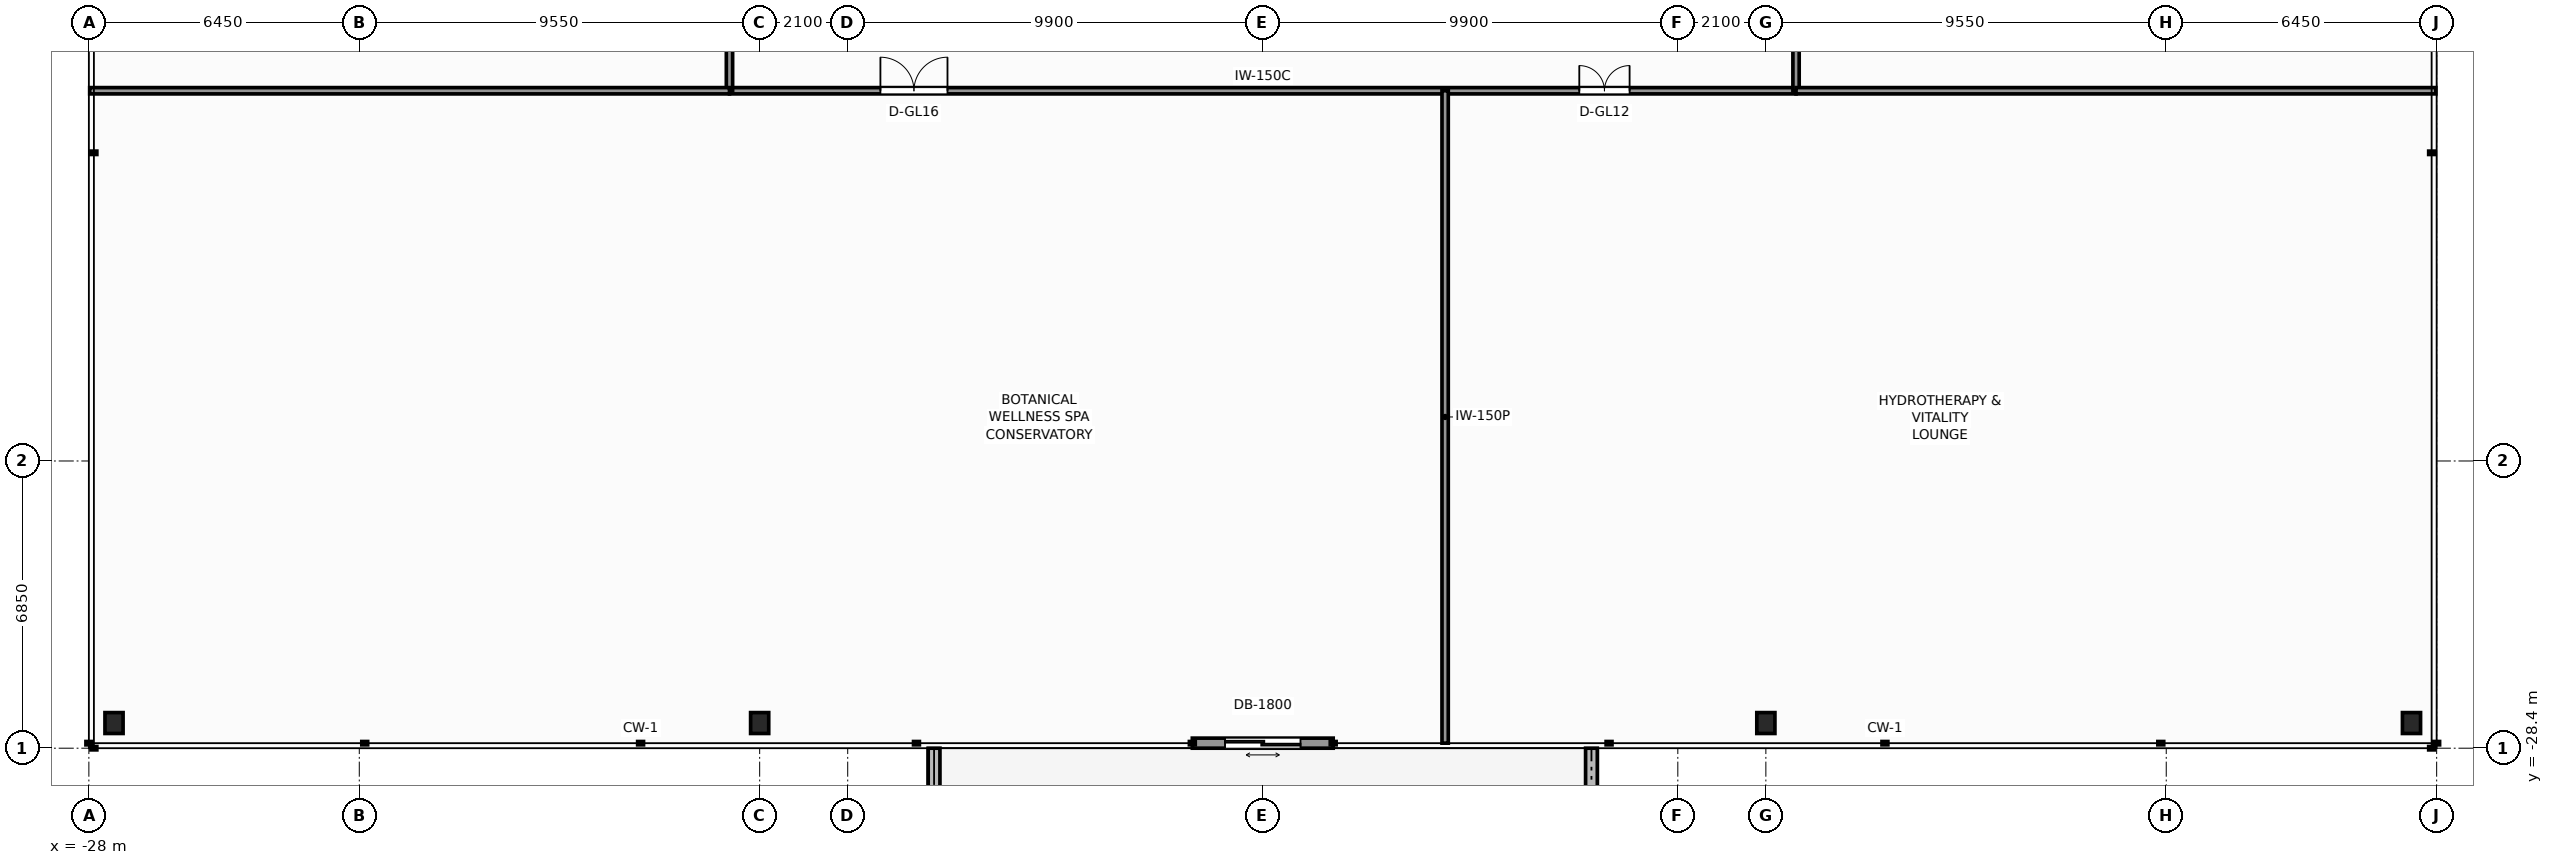
"""IFC4 building model, lengths in metres.
Left out: names, types, materials, properties, quantities, classifications, styles, units other than length and angle.
Written with IfcOpenShell. Run it as: python <this file> out.ifc"""

import sys

from ifc_helpers import new_model, si_unit, direction, frame, frame_2d, origin, origin_2d, place, context, subcontext, project, spatial, rectangle, i_section, extrude, element, fill, save


model = new_model("IFC4")
c1 = context("Model", 3, precision=1e-05, world=origin(), true_north=direction((0.0, 1.0)))
c2 = subcontext(c1, "Body", "Model", "MODEL_VIEW")
j1 = project(units=[si_unit("LENGTHUNIT", "METRE"), si_unit("PLANEANGLEUNIT", "RADIAN")], contexts=[c1])
p1 = place(None, origin())
s1 = spatial("IfcSite", under=j1, at=p1, CompositionType="ELEMENT")
p2 = place(p1, origin())
s2 = spatial("IfcBuilding", under=s1, at=p2, CompositionType="ELEMENT")
p3 = place(p2, frame((0.0, 0.0, 15.2)))
s3 = spatial("IfcBuildingStorey", under=s2, at=p3, CompositionType="ELEMENT", Elevation=15.2)
for number, where, z_axis, x_axis in (
    (1, (-27.4, -27.8, 0.0), (0.0, 0.0, 1.0), (1.0, 0.0, 0.0)),
    (2, (-12.0, -27.8, 0.0), (0.0, 0.0, 1.0), (1.0, 0.0, 0.0)),
    (3, (12.0, -27.8, 0.0), (0.0, 0.0, 1.0), (1.0, 0.0, 0.0)),
    (4, (27.4, -27.8, 0.0), (0.0, 0.0, 1.0), (1.0, 0.0, 0.0)),
):
    element("IfcColumn", number, at=place(p3, frame(where, z_axis=z_axis, x_axis=x_axis)), inside=s3, PredefinedType="COLUMN", context=c2, shape_type="SweptSolid", body=[
        extrude(i_section(OverallWidth=0.432, OverallDepth=0.498, WebThickness=0.056, FlangeThickness=0.089, FilletRadius=0.025, at=origin_2d()), origin(), (0.0, 0.0, 1.0), 4.1),
    ])
for number, where, z_axis, x_axis in (
    (5, (7.84, -31.6, -0.02), (0.0, 0.0, 1.0), (0.0, 1.0, 0.0)),
    (6, (-7.84, -28.4, -0.02), (0.0, 0.0, 1.0), (0.0, -1.0, 0.0)),
):
    element("IfcWall", number, at=place(p3, frame(where, z_axis=z_axis, x_axis=x_axis)), inside=s3, PredefinedType="PARAPET", context=c2, shape_type="SweptSolid", body=[
        extrude(rectangle(XDim=3.2, YDim=0.28, at=frame_2d((1.6, 0.0))), origin(), (0.0, 0.0, 1.0), 0.42),
    ])
p4 = place(p3, frame((1.68, -28.28, 0.0), z_axis=(0.0, 0.0, 1.0), x_axis=(-1.0, 0.0, 0.0)))
e7 = element("IfcWall", 7, at=p4, inside=s3, PredefinedType="STANDARD", context=c2, shape_type="SweptSolid", body=[
    extrude(rectangle(XDim=3.36, YDim=0.24, at=frame_2d((1.68, 0.0))), origin(), (0.0, 0.0, 1.0), 3.7),
])
p5 = place(p4, frame((0.78, 0.0, 0.0)))
e8 = element("IfcOpeningElement", 8, at=p5, cuts=e7, PredefinedType="OPENING", context=c2, shape_type="SweptSolid", body=[
    extrude(rectangle(XDim=1.8, YDim=2.2, at=frame_2d((0.9, 1.1))), frame((0.0, 0.13, 0.0), z_axis=(0.0, -1.0, 0.0), x_axis=(1.0, 0.0, 0.0)), (0.0, 0.0, 1.0), 0.26),
])
p6 = place(p3, frame((-12.72, -12.72, 0.0), z_axis=(0.0, 0.0, 1.0), x_axis=(1.0, 0.0, 0.0)))
e9 = element("IfcWall", 9, at=p6, inside=s3, PredefinedType="PARTITIONING", context=c2, shape_type="SweptSolid", body=[
    extrude(rectangle(XDim=25.44, YDim=0.15, at=frame_2d((12.72, 0.0))), origin(), (0.0, 0.0, 1.0), 2.674),
])
p7 = place(p6, frame((3.6, 0.0, 0.0)))
e10 = element("IfcOpeningElement", 10, at=p7, cuts=e9, PredefinedType="OPENING", context=c2, shape_type="SweptSolid", body=[
    extrude(rectangle(XDim=1.6, YDim=2.3, at=frame_2d((0.8, 1.15))), frame((0.0, 0.085, 0.0), z_axis=(0.0, -1.0, 0.0), x_axis=(1.0, 0.0, 0.0)), (0.0, 0.0, 1.0), 0.17),
])
p8 = place(p6, frame((20.27, 0.0, 0.0)))
e11 = element("IfcOpeningElement", 11, at=p8, cuts=e9, PredefinedType="OPENING", context=c2, shape_type="SweptSolid", body=[
    extrude(rectangle(XDim=1.2, YDim=2.2, at=frame_2d((0.6, 1.1))), frame((0.0, 0.085, 0.0), z_axis=(0.0, -1.0, 0.0), x_axis=(1.0, 0.0, 0.0)), (0.0, 0.0, 1.0), 0.17),
])
p9 = place(p3, frame((-12.72, -12.72, 0.0), z_axis=(0.0, 0.0, 1.0), x_axis=(0.0, 1.0, 0.0)))
e12 = element("IfcWall", 12, at=p9, inside=s3, PredefinedType="PARTITIONING", context=c2, shape_type="SweptSolid", body=[
    extrude(rectangle(XDim=12.42, YDim=0.15, at=frame_2d((6.21, 0.0))), origin(), (0.0, 0.0, 1.0), 2.674),
])
p10 = place(p9, frame((3.4, 0.0, 0.0)))
e13 = element("IfcOpeningElement", 13, at=p10, cuts=e12, PredefinedType="OPENING", context=c2, shape_type="SweptSolid", body=[
    extrude(rectangle(XDim=1.2, YDim=2.2, at=frame_2d((0.6, 1.1))), frame((0.0, 0.085, 0.0), z_axis=(0.0, -1.0, 0.0), x_axis=(1.0, 0.0, 0.0)), (0.0, 0.0, 1.0), 0.17),
])
p11 = place(p3, frame((12.72, -12.72, 0.0), z_axis=(0.0, 0.0, 1.0), x_axis=(0.0, 1.0, 0.0)))
e14 = element("IfcWall", 14, at=p11, inside=s3, PredefinedType="PARTITIONING", context=c2, shape_type="SweptSolid", body=[
    extrude(rectangle(XDim=12.42, YDim=0.15, at=frame_2d((6.21, 0.0))), origin(), (0.0, 0.0, 1.0), 2.674),
])
p12 = place(p11, frame((3.4, 0.0, 0.0)))
e15 = element("IfcOpeningElement", 15, at=p12, cuts=e14, PredefinedType="OPENING", context=c2, shape_type="SweptSolid", body=[
    extrude(rectangle(XDim=0.95, YDim=2.06, at=frame_2d((0.475, 1.03))), frame((0.0, 0.085, 0.0), z_axis=(0.0, -1.0, 0.0), x_axis=(1.0, 0.0, 0.0)), (0.0, 0.0, 1.0), 0.17),
])
for number, where, z_axis, x_axis in (
    (16, (-27.98, -12.72, 0.0), (0.0, 0.0, 1.0), (1.0, 0.0, 0.0)),
    (17, (12.72, -12.72, 0.0), (0.0, 0.0, 1.0), (1.0, 0.0, 0.0)),
):
    element("IfcWall", number, at=place(p3, frame(where, z_axis=z_axis, x_axis=x_axis)), inside=s3, PredefinedType="PARTITIONING", context=c2, shape_type="SweptSolid", body=[
        extrude(rectangle(XDim=15.26, YDim=0.15, at=frame_2d((7.63, 0.0))), origin(), (0.0, 0.0, 1.0), 3.069),
    ])
p13 = place(p3, frame((4.35, -28.28, 0.0), z_axis=(0.0, 0.0, 1.0), x_axis=(0.0, 1.0, 0.0)))
e18 = element("IfcWall", 18, at=p13, inside=s3, PredefinedType="PARTITIONING", context=c2, shape_type="SweptSolid", body=[
    extrude(rectangle(XDim=15.56, YDim=0.15, at=frame_2d((7.78, 0.0))), origin(), (0.0, 0.0, 1.0), 2.737),
])
p14 = place(p5, origin())
e19 = element("IfcDoor", 19, at=p14, inside=s3, OperationType="DOUBLE_DOOR_SLIDING", PredefinedType="DOOR", context=c2, shape_type="SweptSolid", body=[
    extrude(rectangle(XDim=1.8, YDim=2.2, at=frame_2d((0.9, 1.1))), frame((0.0, 0.025, 0.0), z_axis=(0.0, -1.0, 0.0), x_axis=(1.0, 0.0, 0.0)), (0.0, 0.0, 1.0), 0.05),
])
fill(e8, e19)
p15 = place(p7, origin())
e20 = element("IfcDoor", 20, at=p15, inside=s3, OperationType="DOUBLE_DOOR_SINGLE_SWING", PredefinedType="DOOR", context=c2, shape_type="SweptSolid", body=[
    extrude(rectangle(XDim=1.6, YDim=2.3, at=frame_2d((0.8, 1.15))), frame((0.0, 0.025, 0.0), z_axis=(0.0, -1.0, 0.0), x_axis=(1.0, 0.0, 0.0)), (0.0, 0.0, 1.0), 0.05),
])
fill(e10, e20)
p16 = place(p8, origin())
e21 = element("IfcDoor", 21, at=p16, inside=s3, OperationType="DOUBLE_DOOR_SINGLE_SWING", PredefinedType="DOOR", context=c2, shape_type="SweptSolid", body=[
    extrude(rectangle(XDim=1.2, YDim=2.2, at=frame_2d((0.6, 1.1))), frame((0.0, 0.025, 0.0), z_axis=(0.0, -1.0, 0.0), x_axis=(1.0, 0.0, 0.0)), (0.0, 0.0, 1.0), 0.05),
])
fill(e11, e21)
save(model, sys.argv[1])
